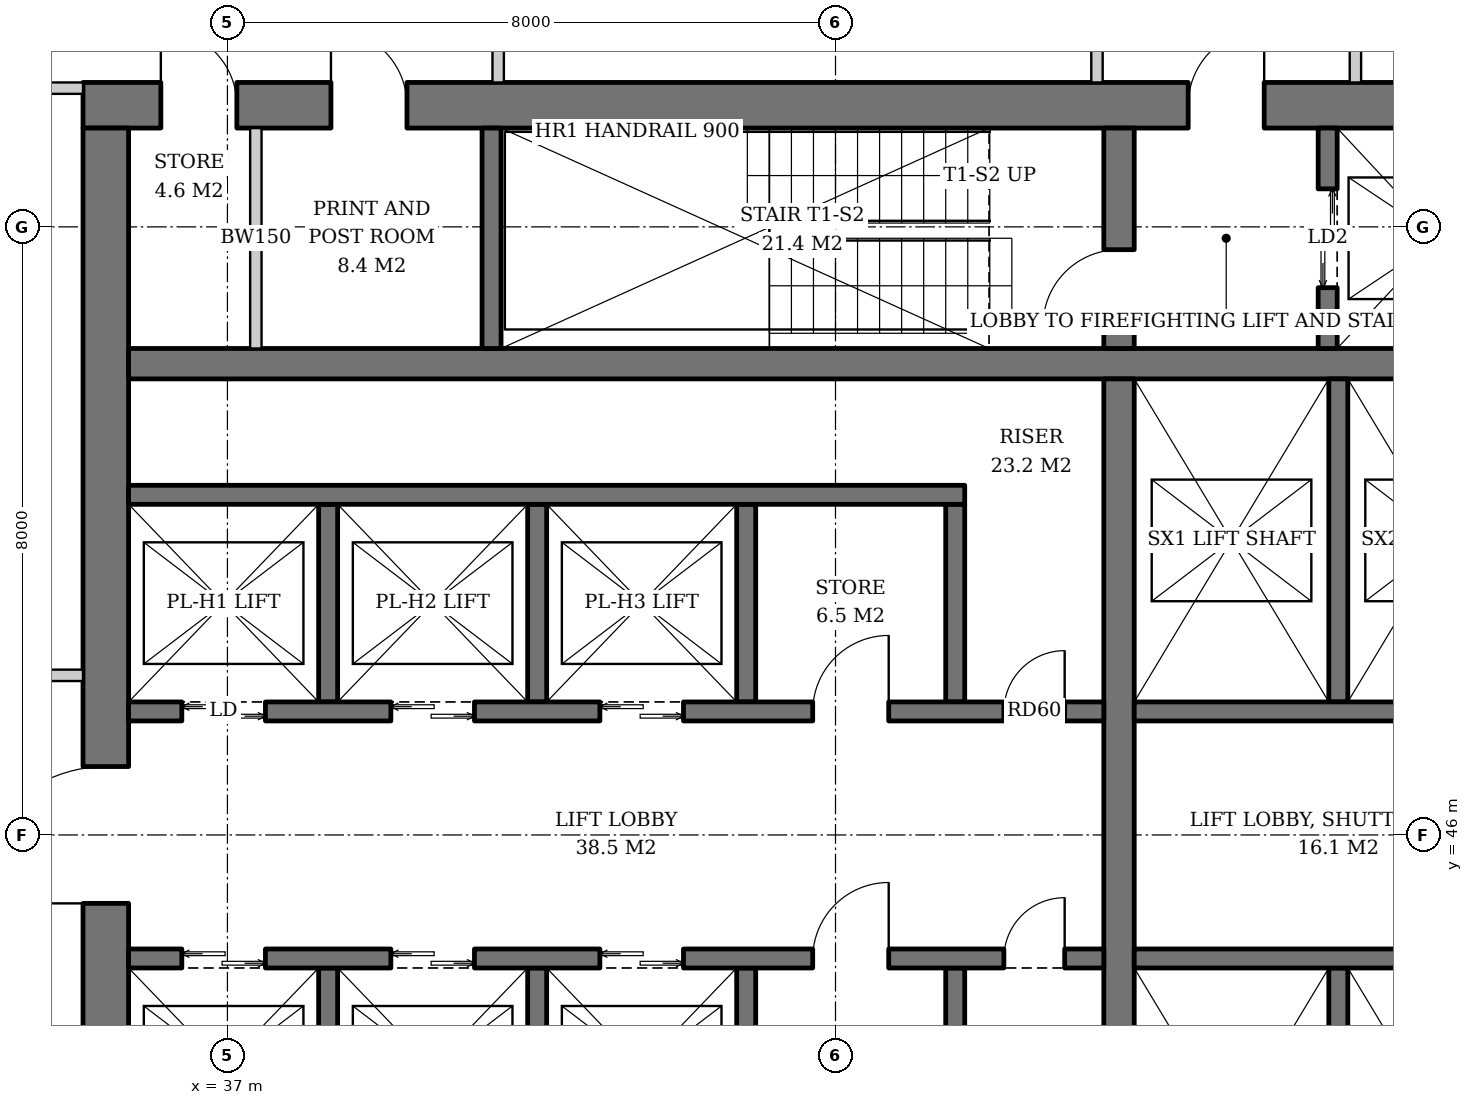
"""IFC4 building model, lengths in metres.
Left out: names, types, materials, properties, quantities, classifications, styles, units other than length and angle.
Written with IfcOpenShell. Run it as: python <this file> out.ifc"""

import sys

from ifc_helpers import new_model, si_unit, direction, frame, frame_2d, origin, place, context, subcontext, project, spatial, rectangle, extrude, element, fill, save


model = new_model("IFC4")
c1 = context("Model", 3, precision=1e-05, world=origin(), true_north=direction((0.0, 1.0)))
c2 = subcontext(c1, "Body", "Model", "MODEL_VIEW")
j1 = project(units=[si_unit("LENGTHUNIT", "METRE"), si_unit("PLANEANGLEUNIT", "RADIAN")], contexts=[c1])
p1 = place(None, origin())
s1 = spatial("IfcSite", under=j1, at=p1, CompositionType="ELEMENT")
p2 = place(p1, origin())
s2 = spatial("IfcBuilding", under=s1, at=p2, CompositionType="ELEMENT")
p3 = place(p2, frame((0.0, 0.0, 214.8)))
s3 = spatial("IfcBuildingStorey", under=s2, at=p3, CompositionType="ELEMENT", Elevation=214.8)
p4 = place(p3, frame((35.1, 55.6, 0.0), z_axis=(0.0, 0.0, 1.0), x_axis=(1.0, 0.0, 0.0)))
e1 = element("IfcWall", 1, at=p4, inside=s3, PredefinedType="SHEAR", context=c2, shape_type="SweptSolid", body=[
    extrude(rectangle(XDim=19.8, YDim=0.6, at=frame_2d((9.9, 0.0))), origin(), (0.0, 0.0, 1.0), 3.8),
])
p5 = place(p4, frame((14.54, 0.0, 0.0)))
e2 = element("IfcOpeningElement", 2, at=p5, cuts=e1, PredefinedType="OPENING", context=c2, shape_type="SweptSolid", body=[
    extrude(rectangle(XDim=1.0, YDim=2.1, at=frame_2d((0.5, 1.05))), frame((0.0, 0.31, 0.0), z_axis=(0.0, -1.0, 0.0), x_axis=(1.0, 0.0, 0.0)), (0.0, 0.0, 1.0), 0.62),
])
p6 = place(p4, frame((1.024, 0.0, 0.0)))
e3 = element("IfcOpeningElement", 3, at=p6, cuts=e1, PredefinedType="OPENING", context=c2, shape_type="SweptSolid", body=[
    extrude(rectangle(XDim=1.0, YDim=2.1, at=frame_2d((0.5, 1.05))), frame((0.0, 0.31, 0.0), z_axis=(0.0, -1.0, 0.0), x_axis=(1.0, 0.0, 0.0)), (0.0, 0.0, 1.0), 0.62),
])
p7 = place(p4, frame((3.262, 0.0, 0.0)))
e4 = element("IfcOpeningElement", 4, at=p7, cuts=e1, PredefinedType="OPENING", context=c2, shape_type="SweptSolid", body=[
    extrude(rectangle(XDim=1.0, YDim=2.1, at=frame_2d((0.5, 1.05))), frame((0.0, 0.31, 0.0), z_axis=(0.0, -1.0, 0.0), x_axis=(1.0, 0.0, 0.0)), (0.0, 0.0, 1.0), 0.62),
])
p8 = place(p3, frame((35.4, 36.7, 0.0), z_axis=(0.0, 0.0, 1.0), x_axis=(0.0, 1.0, 0.0)))
e5 = element("IfcWall", 5, at=p8, inside=s3, PredefinedType="SHEAR", context=c2, shape_type="SweptSolid", body=[
    extrude(rectangle(XDim=18.6, YDim=0.6, at=frame_2d((9.3, 0.0))), origin(), (0.0, 0.0, 1.0), 3.8),
])
p9 = place(p8, frame((8.4, 0.0, 0.0)))
e6 = element("IfcOpeningElement", 6, at=p9, cuts=e5, PredefinedType="OPENING", context=c2, shape_type="SweptSolid", body=[
    extrude(rectangle(XDim=1.8, YDim=2.4, at=frame_2d((0.9, 1.2))), frame((0.0, 0.31, 0.0), z_axis=(0.0, -1.0, 0.0), x_axis=(1.0, 0.0, 0.0)), (0.0, 0.0, 1.0), 0.62),
])
p10 = place(p3, frame((35.7, 52.2, 0.0), z_axis=(0.0, 0.0, 1.0), x_axis=(1.0, 0.0, 0.0)))
e7 = element("IfcWall", 7, at=p10, inside=s3, PredefinedType="SHEAR", context=c2, shape_type="SweptSolid", body=[
    extrude(rectangle(XDim=18.6, YDim=0.4, at=frame_2d((9.3, 0.0))), origin(), (0.0, 0.0, 1.0), 3.8),
])
p11 = place(p3, frame((48.73, 40.0, 0.0), z_axis=(0.0, 0.0, 1.0), x_axis=(0.0, 1.0, 0.0)))
e8 = element("IfcWall", 8, at=p11, inside=s3, PredefinedType="SHEAR", context=c2, shape_type="SweptSolid", body=[
    extrude(rectangle(XDim=12.0, YDim=0.4, at=frame_2d((6.0, 0.0))), origin(), (0.0, 0.0, 1.0), 3.8),
])
p12 = place(p3, frame((48.73, 52.4, 0.0), z_axis=(0.0, 0.0, 1.0), x_axis=(0.0, 1.0, 0.0)))
e9 = element("IfcWall", 9, at=p12, inside=s3, PredefinedType="SHEAR", context=c2, shape_type="SweptSolid", body=[
    extrude(rectangle(XDim=2.9, YDim=0.4, at=frame_2d((1.45, 0.0))), origin(), (0.0, 0.0, 1.0), 3.8),
])
p13 = place(p12, frame((0.3, 0.0, 0.0)))
e10 = element("IfcOpeningElement", 10, at=p13, cuts=e9, PredefinedType="OPENING", context=c2, shape_type="SweptSolid", body=[
    extrude(rectangle(XDim=1.0, YDim=2.1, at=frame_2d((0.5, 1.05))), frame((0.0, 0.21, 0.0), z_axis=(0.0, -1.0, 0.0), x_axis=(1.0, 0.0, 0.0)), (0.0, 0.0, 1.0), 0.42),
])
p14 = place(p3, frame((40.475, 52.4, 0.0), z_axis=(0.0, 0.0, 1.0), x_axis=(0.0, 1.0, 0.0)))
e11 = element("IfcWall", 11, at=p14, inside=s3, PredefinedType="SHEAR", context=c2, shape_type="SweptSolid", body=[
    extrude(rectangle(XDim=2.9, YDim=0.25, at=frame_2d((1.45, 0.0))), origin(), (0.0, 0.0, 1.0), 3.8),
])
p15 = place(p3, frame((51.475, 52.4, 0.0), z_axis=(0.0, 0.0, 1.0), x_axis=(0.0, 1.0, 0.0)))
e12 = element("IfcWall", 12, at=p15, inside=s3, PredefinedType="SHEAR", context=c2, shape_type="SweptSolid", body=[
    extrude(rectangle(XDim=2.9, YDim=0.25, at=frame_2d((1.45, 0.0))), origin(), (0.0, 0.0, 1.0), 3.8),
])
p16 = place(p15, frame((0.8, 0.0, 0.0)))
e13 = element("IfcOpeningElement", 13, at=p16, cuts=e12, PredefinedType="OPENING", context=c2, shape_type="SweptSolid", body=[
    extrude(rectangle(XDim=1.3, YDim=2.2, at=frame_2d((0.65, 1.1))), frame((0.0, 0.135, 0.0), z_axis=(0.0, -1.0, 0.0), x_axis=(1.0, 0.0, 0.0)), (0.0, 0.0, 1.0), 0.27),
])
for number, where, z_axis, x_axis in (
    (14, (38.325, 47.75, 0.0), (0.0, 0.0, 1.0), (0.0, 1.0, 0.0)),
    (15, (41.075, 47.75, 0.0), (0.0, 0.0, 1.0), (0.0, 1.0, 0.0)),
    (16, (43.825, 47.75, 0.0), (0.0, 0.0, 1.0), (0.0, 1.0, 0.0)),
    (17, (46.575, 47.75, 0.0), (0.0, 0.0, 1.0), (0.0, 1.0, 0.0)),
):
    element("IfcWall", number, at=place(p3, frame(where, z_axis=z_axis, x_axis=x_axis)), inside=s3, PredefinedType="SHEAR", context=c2, shape_type="SweptSolid", body=[
        extrude(rectangle(XDim=2.6, YDim=0.25, at=frame_2d((1.3, 0.0))), origin(), (0.0, 0.0, 1.0), 3.8),
    ])
p17 = place(p3, frame((35.7, 50.475, 0.0), z_axis=(0.0, 0.0, 1.0), x_axis=(1.0, 0.0, 0.0)))
e18 = element("IfcWall", 18, at=p17, inside=s3, PredefinedType="SHEAR", context=c2, shape_type="SweptSolid", body=[
    extrude(rectangle(XDim=11.0, YDim=0.25, at=frame_2d((5.5, 0.0))), origin(), (0.0, 0.0, 1.0), 3.8),
])
p18 = place(p3, frame((35.7, 47.625, 0.0), z_axis=(0.0, 0.0, 1.0), x_axis=(1.0, 0.0, 0.0)))
e19 = element("IfcWall", 19, at=p18, inside=s3, PredefinedType="SHEAR", context=c2, shape_type="SweptSolid", body=[
    extrude(rectangle(XDim=12.83, YDim=0.25, at=frame_2d((6.415, 0.0))), origin(), (0.0, 0.0, 1.0), 3.8),
])
p19 = place(p18, frame((0.7, 0.0, 0.0)))
e20 = element("IfcOpeningElement", 20, at=p19, cuts=e19, PredefinedType="OPENING", context=c2, shape_type="SweptSolid", body=[
    extrude(rectangle(XDim=1.1, YDim=2.2, at=frame_2d((0.55, 1.1))), frame((0.0, 0.135, 0.0), z_axis=(0.0, -1.0, 0.0), x_axis=(1.0, 0.0, 0.0)), (0.0, 0.0, 1.0), 0.27),
])
p20 = place(p18, frame((3.45, 0.0, 0.0)))
e21 = element("IfcOpeningElement", 21, at=p20, cuts=e19, PredefinedType="OPENING", context=c2, shape_type="SweptSolid", body=[
    extrude(rectangle(XDim=1.1, YDim=2.2, at=frame_2d((0.55, 1.1))), frame((0.0, 0.135, 0.0), z_axis=(0.0, -1.0, 0.0), x_axis=(1.0, 0.0, 0.0)), (0.0, 0.0, 1.0), 0.27),
])
p21 = place(p18, frame((6.2, 0.0, 0.0)))
e22 = element("IfcOpeningElement", 22, at=p21, cuts=e19, PredefinedType="OPENING", context=c2, shape_type="SweptSolid", body=[
    extrude(rectangle(XDim=1.1, YDim=2.2, at=frame_2d((0.55, 1.1))), frame((0.0, 0.135, 0.0), z_axis=(0.0, -1.0, 0.0), x_axis=(1.0, 0.0, 0.0)), (0.0, 0.0, 1.0), 0.27),
])
p22 = place(p18, frame((9.0, 0.0, 0.0)))
e23 = element("IfcOpeningElement", 23, at=p22, cuts=e19, PredefinedType="OPENING", context=c2, shape_type="SweptSolid", body=[
    extrude(rectangle(XDim=1.0, YDim=2.1, at=frame_2d((0.5, 1.05))), frame((0.0, 0.135, 0.0), z_axis=(0.0, -1.0, 0.0), x_axis=(1.0, 0.0, 0.0)), (0.0, 0.0, 1.0), 0.27),
])
p23 = place(p18, frame((11.515, 0.0, 0.0)))
e24 = element("IfcOpeningElement", 24, at=p23, cuts=e19, PredefinedType="OPENING", context=c2, shape_type="SweptSolid", body=[
    extrude(rectangle(XDim=0.8, YDim=2.0, at=frame_2d((0.4, 1.0))), frame((0.0, 0.135, 0.0), z_axis=(0.0, -1.0, 0.0), x_axis=(1.0, 0.0, 0.0)), (0.0, 0.0, 1.0), 0.27),
])
for number, where, z_axis, x_axis in (
    (25, (38.325, 44.25, 0.0), (0.0, 0.0, 1.0), (0.0, -1.0, 0.0)),
    (26, (41.075, 44.25, 0.0), (0.0, 0.0, 1.0), (0.0, -1.0, 0.0)),
    (27, (43.825, 44.25, 0.0), (0.0, 0.0, 1.0), (0.0, -1.0, 0.0)),
    (28, (46.575, 44.25, 0.0), (0.0, 0.0, 1.0), (0.0, -1.0, 0.0)),
):
    element("IfcWall", number, at=place(p3, frame(where, z_axis=z_axis, x_axis=x_axis)), inside=s3, PredefinedType="SHEAR", context=c2, shape_type="SweptSolid", body=[
        extrude(rectangle(XDim=2.6, YDim=0.25, at=frame_2d((1.3, 0.0))), origin(), (0.0, 0.0, 1.0), 3.8),
    ])
p24 = place(p3, frame((35.7, 44.375, 0.0), z_axis=(0.0, 0.0, 1.0), x_axis=(1.0, 0.0, 0.0)))
e29 = element("IfcWall", 29, at=p24, inside=s3, PredefinedType="SHEAR", context=c2, shape_type="SweptSolid", body=[
    extrude(rectangle(XDim=12.83, YDim=0.25, at=frame_2d((6.415, 0.0))), origin(), (0.0, 0.0, 1.0), 3.8),
])
p25 = place(p24, frame((0.7, 0.0, 0.0)))
e30 = element("IfcOpeningElement", 30, at=p25, cuts=e29, PredefinedType="OPENING", context=c2, shape_type="SweptSolid", body=[
    extrude(rectangle(XDim=1.1, YDim=2.2, at=frame_2d((0.55, 1.1))), frame((0.0, 0.135, 0.0), z_axis=(0.0, -1.0, 0.0), x_axis=(1.0, 0.0, 0.0)), (0.0, 0.0, 1.0), 0.27),
])
p26 = place(p24, frame((3.45, 0.0, 0.0)))
e31 = element("IfcOpeningElement", 31, at=p26, cuts=e29, PredefinedType="OPENING", context=c2, shape_type="SweptSolid", body=[
    extrude(rectangle(XDim=1.1, YDim=2.2, at=frame_2d((0.55, 1.1))), frame((0.0, 0.135, 0.0), z_axis=(0.0, -1.0, 0.0), x_axis=(1.0, 0.0, 0.0)), (0.0, 0.0, 1.0), 0.27),
])
p27 = place(p24, frame((6.2, 0.0, 0.0)))
e32 = element("IfcOpeningElement", 32, at=p27, cuts=e29, PredefinedType="OPENING", context=c2, shape_type="SweptSolid", body=[
    extrude(rectangle(XDim=1.1, YDim=2.2, at=frame_2d((0.55, 1.1))), frame((0.0, 0.135, 0.0), z_axis=(0.0, -1.0, 0.0), x_axis=(1.0, 0.0, 0.0)), (0.0, 0.0, 1.0), 0.27),
])
p28 = place(p24, frame((9.0, 0.0, 0.0)))
e33 = element("IfcOpeningElement", 33, at=p28, cuts=e29, PredefinedType="OPENING", context=c2, shape_type="SweptSolid", body=[
    extrude(rectangle(XDim=1.0, YDim=2.1, at=frame_2d((0.5, 1.05))), frame((0.0, 0.135, 0.0), z_axis=(0.0, -1.0, 0.0), x_axis=(1.0, 0.0, 0.0)), (0.0, 0.0, 1.0), 0.27),
])
p29 = place(p24, frame((11.515, 0.0, 0.0)))
e34 = element("IfcOpeningElement", 34, at=p29, cuts=e29, PredefinedType="OPENING", context=c2, shape_type="SweptSolid", body=[
    extrude(rectangle(XDim=0.8, YDim=2.0, at=frame_2d((0.4, 1.0))), frame((0.0, 0.135, 0.0), z_axis=(0.0, -1.0, 0.0), x_axis=(1.0, 0.0, 0.0)), (0.0, 0.0, 1.0), 0.27),
])
p30 = place(p3, frame((51.615, 47.75, 0.0), z_axis=(0.0, 0.0, 1.0), x_axis=(0.0, 1.0, 0.0)))
e35 = element("IfcWall", 35, at=p30, inside=s3, PredefinedType="SHEAR", context=c2, shape_type="SweptSolid", body=[
    extrude(rectangle(XDim=4.25, YDim=0.25, at=frame_2d((2.125, 0.0))), origin(), (0.0, 0.0, 1.0), 3.8),
])
p31 = place(p3, frame((48.93, 47.625, 0.0), z_axis=(0.0, 0.0, 1.0), x_axis=(1.0, 0.0, 0.0)))
e36 = element("IfcWall", 36, at=p31, inside=s3, PredefinedType="SHEAR", context=c2, shape_type="SweptSolid", body=[
    extrude(rectangle(XDim=5.37, YDim=0.25, at=frame_2d((2.685, 0.0))), origin(), (0.0, 0.0, 1.0), 3.8),
])
p32 = place(p3, frame((51.615, 44.25, 0.0), z_axis=(0.0, 0.0, 1.0), x_axis=(0.0, -1.0, 0.0)))
e37 = element("IfcWall", 37, at=p32, inside=s3, PredefinedType="SHEAR", context=c2, shape_type="SweptSolid", body=[
    extrude(rectangle(XDim=4.25, YDim=0.25, at=frame_2d((2.125, 0.0))), origin(), (0.0, 0.0, 1.0), 3.8),
])
p33 = place(p3, frame((48.93, 44.375, 0.0), z_axis=(0.0, 0.0, 1.0), x_axis=(1.0, 0.0, 0.0)))
e38 = element("IfcWall", 38, at=p33, inside=s3, PredefinedType="SHEAR", context=c2, shape_type="SweptSolid", body=[
    extrude(rectangle(XDim=5.37, YDim=0.25, at=frame_2d((2.685, 0.0))), origin(), (0.0, 0.0, 1.0), 3.8),
])
p34 = place(p3, frame((37.374, 52.4, 0.0), z_axis=(0.0, 0.0, 1.0), x_axis=(0.0, 1.0, 0.0)))
e39 = element("IfcWall", 39, at=p34, inside=s3, PredefinedType="SOLIDWALL", context=c2, shape_type="SweptSolid", body=[
    extrude(rectangle(XDim=2.9, YDim=0.15, at=frame_2d((1.45, 0.0))), origin(), (0.0, 0.0, 1.0), 3.62),
])
for number, where, z_axis, x_axis in (
    (40, (51.84, 55.9, 0.0), (0.0, 0.0, 1.0), (0.0, 1.0, 0.0)),
    (41, (48.44, 55.9, 0.0), (0.0, 0.0, 1.0), (0.0, 1.0, 0.0)),
    (42, (40.562, 55.9, 0.0), (0.0, 0.0, 1.0), (0.0, 1.0, 0.0)),
):
    element("IfcWall", number, at=place(p3, frame(where, z_axis=z_axis, x_axis=x_axis)), inside=s3, PredefinedType="PARTITIONING", context=c2, shape_type="SweptSolid", body=[
        extrude(rectangle(XDim=2.325, YDim=0.15, at=frame_2d((1.163, 0.0))), origin(), (0.0, 0.0, 1.0), 3.62),
    ])
p35 = place(p3, frame((35.1, 55.825, 0.0), z_axis=(0.0, 0.0, 1.0), x_axis=(-1.0, 0.0, 0.0)))
e43 = element("IfcWall", 43, at=p35, inside=s3, PredefinedType="PARTITIONING", context=c2, shape_type="SweptSolid", body=[
    extrude(rectangle(XDim=2.325, YDim=0.15, at=frame_2d((1.163, 0.0))), origin(), (0.0, 0.0, 1.0), 2.92),
])
p36 = place(p3, frame((35.1, 48.1, 0.0), z_axis=(0.0, 0.0, 1.0), x_axis=(-1.0, 0.0, 0.0)))
e44 = element("IfcWall", 44, at=p36, inside=s3, PredefinedType="PARTITIONING", context=c2, shape_type="SweptSolid", body=[
    extrude(rectangle(XDim=2.325, YDim=0.15, at=frame_2d((1.163, 0.0))), origin(), (0.0, 0.0, 1.0), 3.62),
])
p37 = place(p16, origin())
e45 = element("IfcDoor", 45, at=p37, inside=s3, OperationType="DOUBLE_DOOR_SLIDING", PredefinedType="DOOR", context=c2, shape_type="SweptSolid", body=[
    extrude(rectangle(XDim=1.3, YDim=2.2, at=frame_2d((0.65, 1.1))), frame((0.0, 0.025, 0.0), z_axis=(0.0, -1.0, 0.0), x_axis=(1.0, 0.0, 0.0)), (0.0, 0.0, 1.0), 0.05),
])
fill(e13, e45)
p38 = place(p19, origin())
e46 = element("IfcDoor", 46, at=p38, inside=s3, OperationType="DOUBLE_DOOR_SLIDING", PredefinedType="DOOR", context=c2, shape_type="SweptSolid", body=[
    extrude(rectangle(XDim=1.1, YDim=2.2, at=frame_2d((0.55, 1.1))), frame((0.0, 0.025, 0.0), z_axis=(0.0, -1.0, 0.0), x_axis=(1.0, 0.0, 0.0)), (0.0, 0.0, 1.0), 0.05),
])
fill(e20, e46)
p39 = place(p20, origin())
e47 = element("IfcDoor", 47, at=p39, inside=s3, OperationType="DOUBLE_DOOR_SLIDING", PredefinedType="DOOR", context=c2, shape_type="SweptSolid", body=[
    extrude(rectangle(XDim=1.1, YDim=2.2, at=frame_2d((0.55, 1.1))), frame((0.0, 0.025, 0.0), z_axis=(0.0, -1.0, 0.0), x_axis=(1.0, 0.0, 0.0)), (0.0, 0.0, 1.0), 0.05),
])
fill(e21, e47)
p40 = place(p21, origin())
e48 = element("IfcDoor", 48, at=p40, inside=s3, OperationType="DOUBLE_DOOR_SLIDING", PredefinedType="DOOR", context=c2, shape_type="SweptSolid", body=[
    extrude(rectangle(XDim=1.1, YDim=2.2, at=frame_2d((0.55, 1.1))), frame((0.0, 0.025, 0.0), z_axis=(0.0, -1.0, 0.0), x_axis=(1.0, 0.0, 0.0)), (0.0, 0.0, 1.0), 0.05),
])
fill(e22, e48)
p41 = place(p22, origin())
e49 = element("IfcDoor", 49, at=p41, inside=s3, OperationType="SINGLE_SWING_RIGHT", PredefinedType="DOOR", context=c2, shape_type="SweptSolid", body=[
    extrude(rectangle(XDim=1.0, YDim=2.1, at=frame_2d((0.5, 1.05))), frame((0.0, 0.025, 0.0), z_axis=(0.0, -1.0, 0.0), x_axis=(1.0, 0.0, 0.0)), (0.0, 0.0, 1.0), 0.05),
])
fill(e23, e49)
p42 = place(p23, origin())
e50 = element("IfcDoor", 50, at=p42, inside=s3, OperationType="SINGLE_SWING_RIGHT", PredefinedType="DOOR", context=c2, shape_type="SweptSolid", body=[
    extrude(rectangle(XDim=0.8, YDim=2.0, at=frame_2d((0.4, 1.0))), frame((0.0, 0.025, 0.0), z_axis=(0.0, -1.0, 0.0), x_axis=(1.0, 0.0, 0.0)), (0.0, 0.0, 1.0), 0.05),
])
fill(e24, e50)
p43 = place(p25, origin())
e51 = element("IfcDoor", 51, at=p43, inside=s3, OperationType="DOUBLE_DOOR_SLIDING", PredefinedType="DOOR", context=c2, shape_type="SweptSolid", body=[
    extrude(rectangle(XDim=1.1, YDim=2.2, at=frame_2d((0.55, 1.1))), frame((0.0, 0.025, 0.0), z_axis=(0.0, -1.0, 0.0), x_axis=(1.0, 0.0, 0.0)), (0.0, 0.0, 1.0), 0.05),
])
fill(e30, e51)
p44 = place(p26, origin())
e52 = element("IfcDoor", 52, at=p44, inside=s3, OperationType="DOUBLE_DOOR_SLIDING", PredefinedType="DOOR", context=c2, shape_type="SweptSolid", body=[
    extrude(rectangle(XDim=1.1, YDim=2.2, at=frame_2d((0.55, 1.1))), frame((0.0, 0.025, 0.0), z_axis=(0.0, -1.0, 0.0), x_axis=(1.0, 0.0, 0.0)), (0.0, 0.0, 1.0), 0.05),
])
fill(e31, e52)
p45 = place(p27, origin())
e53 = element("IfcDoor", 53, at=p45, inside=s3, OperationType="DOUBLE_DOOR_SLIDING", PredefinedType="DOOR", context=c2, shape_type="SweptSolid", body=[
    extrude(rectangle(XDim=1.1, YDim=2.2, at=frame_2d((0.55, 1.1))), frame((0.0, 0.025, 0.0), z_axis=(0.0, -1.0, 0.0), x_axis=(1.0, 0.0, 0.0)), (0.0, 0.0, 1.0), 0.05),
])
fill(e32, e53)
p46 = place(p28, origin())
e54 = element("IfcDoor", 54, at=p46, inside=s3, OperationType="SINGLE_SWING_RIGHT", PredefinedType="DOOR", context=c2, shape_type="SweptSolid", body=[
    extrude(rectangle(XDim=1.0, YDim=2.1, at=frame_2d((0.5, 1.05))), frame((0.0, 0.025, 0.0), z_axis=(0.0, -1.0, 0.0), x_axis=(1.0, 0.0, 0.0)), (0.0, 0.0, 1.0), 0.05),
])
fill(e33, e54)
p47 = place(p29, origin())
e55 = element("IfcDoor", 55, at=p47, inside=s3, OperationType="SINGLE_SWING_RIGHT", PredefinedType="DOOR", context=c2, shape_type="SweptSolid", body=[
    extrude(rectangle(XDim=0.8, YDim=2.0, at=frame_2d((0.4, 1.0))), frame((0.0, 0.025, 0.0), z_axis=(0.0, -1.0, 0.0), x_axis=(1.0, 0.0, 0.0)), (0.0, 0.0, 1.0), 0.05),
])
fill(e34, e55)
p48 = place(p13, origin())
e56 = element("IfcDoor", 56, at=p48, inside=s3, OperationType="SINGLE_SWING_LEFT", PredefinedType="DOOR", context=c2, shape_type="SweptSolid", body=[
    extrude(rectangle(XDim=1.0, YDim=2.1, at=frame_2d((0.5, 1.05))), frame((0.0, 0.025, 0.0), z_axis=(0.0, -1.0, 0.0), x_axis=(1.0, 0.0, 0.0)), (0.0, 0.0, 1.0), 0.05),
])
fill(e10, e56)
p49 = place(p5, origin())
e57 = element("IfcDoor", 57, at=p49, inside=s3, OperationType="SINGLE_SWING_RIGHT", PredefinedType="DOOR", context=c2, shape_type="SweptSolid", body=[
    extrude(rectangle(XDim=1.0, YDim=2.1, at=frame_2d((0.5, 1.05))), frame((0.0, 0.025, 0.0), z_axis=(0.0, -1.0, 0.0), x_axis=(1.0, 0.0, 0.0)), (0.0, 0.0, 1.0), 0.05),
])
fill(e2, e57)
p50 = place(p9, origin())
e58 = element("IfcDoor", 58, at=p50, inside=s3, OperationType="DOUBLE_DOOR_SINGLE_SWING", PredefinedType="DOOR", context=c2, shape_type="SweptSolid", body=[
    extrude(rectangle(XDim=1.8, YDim=2.4, at=frame_2d((0.9, 1.2))), frame((0.0, 0.025, 0.0), z_axis=(0.0, -1.0, 0.0), x_axis=(1.0, 0.0, 0.0)), (0.0, 0.0, 1.0), 0.05),
])
fill(e6, e58)
p51 = place(p6, origin())
e59 = element("IfcDoor", 59, at=p51, inside=s3, OperationType="SINGLE_SWING_LEFT", PredefinedType="DOOR", context=c2, shape_type="SweptSolid", body=[
    extrude(rectangle(XDim=1.0, YDim=2.1, at=frame_2d((0.5, 1.05))), frame((0.0, -0.24, 0.0), z_axis=(0.0, -1.0, 0.0), x_axis=(1.0, 0.0, 0.0)), (0.0, 0.0, 1.0), 0.05),
])
fill(e3, e59)
p52 = place(p7, origin())
e60 = element("IfcDoor", 60, at=p52, inside=s3, OperationType="SINGLE_SWING_LEFT", PredefinedType="DOOR", context=c2, shape_type="SweptSolid", body=[
    extrude(rectangle(XDim=1.0, YDim=2.1, at=frame_2d((0.5, 1.05))), frame((0.0, -0.24, 0.0), z_axis=(0.0, -1.0, 0.0), x_axis=(1.0, 0.0, 0.0)), (0.0, 0.0, 1.0), 0.05),
])
fill(e4, e60)
save(model, sys.argv[1])
